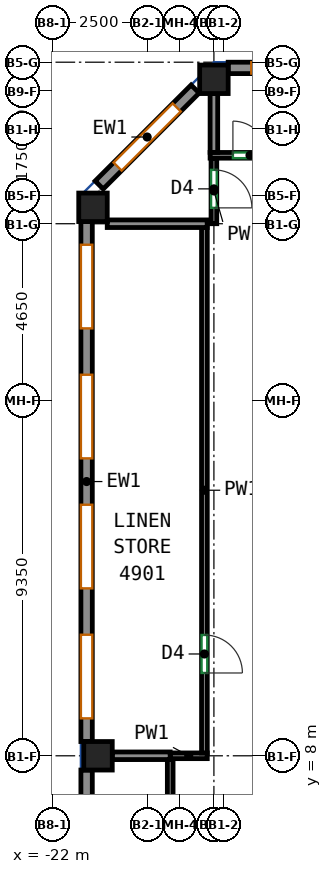
"""IFC4 building model, lengths in metres.
Left out: names, types, materials, properties, quantities, classifications, styles, units other than length and angle.
Written with IfcOpenShell. Run it as: python <this file> out.ifc"""

import sys

from ifc_helpers import new_model, si_unit, direction, frame, frame_2d, origin, origin_2d, place, context, subcontext, project, spatial, rectangle, extrude, source, transform, mapped, element, fill, save


model = new_model("IFC4")
c1 = context("Model", 3, precision=1e-05, world=origin(), true_north=direction((0.0, 1.0)))
c2 = subcontext(c1, "Body", "Model", "MODEL_VIEW")
j1 = project(units=[si_unit("LENGTHUNIT", "METRE"), si_unit("PLANEANGLEUNIT", "RADIAN")], contexts=[c1])
p1 = place(None, origin())
s1 = spatial("IfcSite", under=j1, at=p1, CompositionType="ELEMENT")
p2 = place(p1, origin())
s2 = spatial("IfcBuilding", under=s1, at=p2, CompositionType="ELEMENT")
p3 = place(p2, frame((0.0, 0.0, 203.3)))
s3 = spatial("IfcBuildingStorey", under=s2, at=p3, CompositionType="ELEMENT", Elevation=203.3)
m1 = source(origin(), c2, "Body", "SweptSolid", [
    extrude(rectangle(XDim=0.75, YDim=0.75, at=origin_2d()), origin(), (0.0, 0.0, 1.0), 3.12),
])
for number, where, z_axis, x_axis in (
    (1, (-20.932, 22.432, 0.0), (0.0, 0.0, 1.0), (1.0, 0.0, 0.0)),
    (2, (-20.8, 8.0, 0.0), (0.0, 0.0, 1.0), (1.0, 0.0, 0.0)),
    (3, (-17.75, 25.8, 0.0), (0.0, 0.0, 1.0), (1.0, 0.0, 0.0)),
):
    element("IfcColumn", number, at=place(p3, frame(where, z_axis=z_axis, x_axis=x_axis)), inside=s3, PredefinedType="COLUMN", context=c2, shape_type="MappedRepresentation", body=[
        mapped(m1, transform((0.0, 0.0, 0.0))),
    ])
m2 = source(origin(), c2, "Body", "SweptSolid", [
    extrude(rectangle(XDim=6.833, YDim=0.3, at=frame_2d((3.417, 0.0))), origin(), (0.0, 0.0, 1.0), 3.12),
])
p4 = place(p3, frame((-10.542, 26.1, 0.0), z_axis=(0.0, 0.0, 1.0), x_axis=(-1.0, 0.0, 0.0)))
e4 = element("IfcWall", 4, at=p4, inside=s3, PredefinedType="SOLIDWALL", context=c2, shape_type="MappedRepresentation", body=[
    mapped(m2, transform((0.0, 0.0, 0.0))),
])
p5 = place(p4, frame((0.608, 0.0, 0.85)))
e5 = element("IfcOpeningElement", 5, at=p5, cuts=e4, PredefinedType="OPENING", context=c2, shape_type="SweptSolid", body=[
    extrude(rectangle(XDim=2.2, YDim=1.95, at=frame_2d((1.1, 0.975))), frame((0.0, 0.16, 0.0), z_axis=(0.0, -1.0, 0.0), x_axis=(1.0, 0.0, 0.0)), (0.0, 0.0, 1.0), 0.32),
])
p6 = place(p4, frame((4.025, 0.0, 0.85)))
e6 = element("IfcOpeningElement", 6, at=p6, cuts=e4, PredefinedType="OPENING", context=c2, shape_type="SweptSolid", body=[
    extrude(rectangle(XDim=2.2, YDim=1.95, at=frame_2d((1.1, 0.975))), frame((0.0, 0.16, 0.0), z_axis=(0.0, -1.0, 0.0), x_axis=(1.0, 0.0, 0.0)), (0.0, 0.0, 1.0), 0.32),
])
m3 = source(origin(), c2, "Body", "SweptSolid", [
    extrude(rectangle(XDim=3.571, YDim=0.3, at=frame_2d((1.786, 0.0))), origin(), (0.0, 0.0, 1.0), 3.12),
])
p7 = place(p3, frame((-18.244, 25.544, 0.0), z_axis=(0.0, 0.0, 1.0), x_axis=(-0.707072595841, -0.707140964879, 0.0)))
e7 = element("IfcWall", 7, at=p7, inside=s3, PredefinedType="SOLIDWALL", context=c2, shape_type="MappedRepresentation", body=[
    mapped(m3, transform((0.0, 0.0, 0.0))),
])
p8 = place(p7, frame((0.686, 0.0, 0.85)))
e8 = element("IfcOpeningElement", 8, at=p8, cuts=e7, PredefinedType="OPENING", context=c2, shape_type="SweptSolid", body=[
    extrude(rectangle(XDim=2.2, YDim=1.95, at=frame_2d((1.1, 0.975))), frame((0.0, 0.16, 0.0), z_axis=(0.0, -1.0, 0.0), x_axis=(1.0, 0.0, 0.0)), (0.0, 0.0, 1.0), 0.32),
])
m4 = source(origin(), c2, "Body", "SweptSolid", [
    extrude(rectangle(XDim=13.682, YDim=0.3, at=frame_2d((6.841, 0.0))), origin(), (0.0, 0.0, 1.0), 3.12),
])
p9 = place(p3, frame((-21.1, 22.057, 0.0), z_axis=(0.0, 0.0, 1.0), x_axis=(0.0, -1.0, 0.0)))
e9 = element("IfcWall", 9, at=p9, inside=s3, PredefinedType="SOLIDWALL", context=c2, shape_type="MappedRepresentation", body=[
    mapped(m4, transform((0.0, 0.0, 0.0))),
])
p10 = place(p9, frame((0.61, 0.0, 0.85)))
e10 = element("IfcOpeningElement", 10, at=p10, cuts=e9, PredefinedType="OPENING", context=c2, shape_type="SweptSolid", body=[
    extrude(rectangle(XDim=2.2, YDim=1.95, at=frame_2d((1.1, 0.975))), frame((0.0, 0.16, 0.0), z_axis=(0.0, -1.0, 0.0), x_axis=(1.0, 0.0, 0.0)), (0.0, 0.0, 1.0), 0.32),
])
p11 = place(p9, frame((4.031, 0.0, 0.85)))
e11 = element("IfcOpeningElement", 11, at=p11, cuts=e9, PredefinedType="OPENING", context=c2, shape_type="SweptSolid", body=[
    extrude(rectangle(XDim=2.2, YDim=1.95, at=frame_2d((1.1, 0.975))), frame((0.0, 0.16, 0.0), z_axis=(0.0, -1.0, 0.0), x_axis=(1.0, 0.0, 0.0)), (0.0, 0.0, 1.0), 0.32),
])
p12 = place(p9, frame((7.451, 0.0, 0.85)))
e12 = element("IfcOpeningElement", 12, at=p12, cuts=e9, PredefinedType="OPENING", context=c2, shape_type="SweptSolid", body=[
    extrude(rectangle(XDim=2.2, YDim=1.95, at=frame_2d((1.1, 0.975))), frame((0.0, 0.16, 0.0), z_axis=(0.0, -1.0, 0.0), x_axis=(1.0, 0.0, 0.0)), (0.0, 0.0, 1.0), 0.32),
])
p13 = place(p9, frame((10.872, 0.0, 0.85)))
e13 = element("IfcOpeningElement", 13, at=p13, cuts=e9, PredefinedType="OPENING", context=c2, shape_type="SweptSolid", body=[
    extrude(rectangle(XDim=2.2, YDim=1.95, at=frame_2d((1.1, 0.975))), frame((0.0, 0.16, 0.0), z_axis=(0.0, -1.0, 0.0), x_axis=(1.0, 0.0, 0.0)), (0.0, 0.0, 1.0), 0.32),
])
m5 = source(origin(), c2, "Body", "SweptSolid", [
    extrude(rectangle(XDim=7.812, YDim=0.3, at=frame_2d((3.906, 0.0))), origin(), (0.0, 0.0, 1.0), 3.12),
])
p14 = place(p3, frame((-21.1, 7.625, 0.0), z_axis=(0.0, 0.0, 1.0), x_axis=(0.0, -1.0, 0.0)))
e14 = element("IfcWall", 14, at=p14, inside=s3, PredefinedType="SOLIDWALL", context=c2, shape_type="MappedRepresentation", body=[
    mapped(m5, transform((0.0, 0.0, 0.0))),
])
p15 = place(p14, frame((0.853, 0.0, 0.85)))
e15 = element("IfcOpeningElement", 15, at=p15, cuts=e14, PredefinedType="OPENING", context=c2, shape_type="SweptSolid", body=[
    extrude(rectangle(XDim=2.2, YDim=1.95, at=frame_2d((1.1, 0.975))), frame((0.0, 0.16, 0.0), z_axis=(0.0, -1.0, 0.0), x_axis=(1.0, 0.0, 0.0)), (0.0, 0.0, 1.0), 0.32),
])
p16 = place(p14, frame((4.759, 0.0, 0.85)))
e16 = element("IfcOpeningElement", 16, at=p16, cuts=e14, PredefinedType="OPENING", context=c2, shape_type="SweptSolid", body=[
    extrude(rectangle(XDim=2.2, YDim=1.95, at=frame_2d((1.1, 0.975))), frame((0.0, 0.16, 0.0), z_axis=(0.0, -1.0, 0.0), x_axis=(1.0, 0.0, 0.0)), (0.0, 0.0, 1.0), 0.32),
])
p17 = place(p3, frame((-17.925, 8.0, 0.0), z_axis=(0.0, 0.0, 1.0), x_axis=(-1.0, 0.0, 0.0)))
e17 = element("IfcWall", 17, at=p17, inside=s3, PredefinedType="PARTITIONING", context=c2, shape_type="SweptSolid", body=[
    extrude(rectangle(XDim=0.976, YDim=0.15, at=frame_2d((0.488, 0.0))), origin(), (0.0, 0.0, 1.0), 3.12),
])
p18 = place(p3, frame((-18.0, 21.9, 0.0), z_axis=(0.0, 0.0, 1.0), x_axis=(0.0, -1.0, 0.0)))
e18 = element("IfcWall", 18, at=p18, inside=s3, PredefinedType="PARTITIONING", context=c2, shape_type="SweptSolid", body=[
    extrude(rectangle(XDim=13.825, YDim=0.15, at=frame_2d((6.913, 0.0))), origin(), (0.0, 0.0, 1.0), 3.12),
])
p19 = place(p18, frame((10.721, 0.0, 0.0)))
e19 = element("IfcOpeningElement", 19, at=p19, cuts=e18, PredefinedType="OPENING", context=c2, shape_type="SweptSolid", body=[
    extrude(rectangle(XDim=1.0, YDim=2.1, at=frame_2d((0.5, 1.05))), frame((0.0, 0.085, 0.0), z_axis=(0.0, -1.0, 0.0), x_axis=(1.0, 0.0, 0.0)), (0.0, 0.0, 1.0), 0.17),
])
p20 = place(p3, frame((-18.9, 3.809, 0.0), z_axis=(0.0, 0.0, 1.0), x_axis=(0.0, 1.0, 0.0)))
e20 = element("IfcWall", 20, at=p20, inside=s3, PredefinedType="PARTITIONING", context=c2, shape_type="SweptSolid", body=[
    extrude(rectangle(XDim=4.092, YDim=0.15, at=frame_2d((2.046, 0.0))), origin(), (0.0, 0.0, 1.0), 3.12),
])
p21 = place(p20, frame((2.111, 0.0, 0.0)))
e21 = element("IfcOpeningElement", 21, at=p21, cuts=e20, PredefinedType="OPENING", context=c2, shape_type="SweptSolid", body=[
    extrude(rectangle(XDim=1.0, YDim=2.1, at=frame_2d((0.5, 1.05))), frame((0.0, 0.085, 0.0), z_axis=(0.0, -1.0, 0.0), x_axis=(1.0, 0.0, 0.0)), (0.0, 0.0, 1.0), 0.17),
])
p22 = place(p3, frame((-17.75, 23.725, 0.0), z_axis=(0.0, 0.0, 1.0), x_axis=(0.0, -1.0, 0.0)))
e22 = element("IfcWall", 22, at=p22, inside=s3, PredefinedType="PARTITIONING", context=c2, shape_type="SweptSolid", body=[
    extrude(rectangle(XDim=1.725, YDim=0.15, at=frame_2d((0.863, 0.0))), origin(), (0.0, 0.0, 1.0), 3.12),
])
p23 = place(p22, frame((0.308, 0.0, 0.0)))
e23 = element("IfcOpeningElement", 23, at=p23, cuts=e22, PredefinedType="OPENING", context=c2, shape_type="SweptSolid", body=[
    extrude(rectangle(XDim=1.0, YDim=2.1, at=frame_2d((0.5, 1.05))), frame((0.0, 0.085, 0.0), z_axis=(0.0, -1.0, 0.0), x_axis=(1.0, 0.0, 0.0)), (0.0, 0.0, 1.0), 0.17),
])
p24 = place(p3, frame((-17.85, 23.8, 0.0), z_axis=(0.0, 0.0, 1.0), x_axis=(1.0, 0.0, 0.0)))
e24 = element("IfcWall", 24, at=p24, inside=s3, PredefinedType="PARTITIONING", context=c2, shape_type="SweptSolid", body=[
    extrude(rectangle(XDim=45.7, YDim=0.15, at=frame_2d((22.85, 0.0))), origin(), (0.0, 0.0, 1.0), 3.12),
])
p25 = place(p24, frame((0.6, 0.0, 0.0)))
e25 = element("IfcOpeningElement", 25, at=p25, cuts=e24, PredefinedType="OPENING", context=c2, shape_type="SweptSolid", body=[
    extrude(rectangle(XDim=0.9, YDim=2.1, at=frame_2d((0.45, 1.05))), frame((0.0, 0.085, 0.0), z_axis=(0.0, -1.0, 0.0), x_axis=(1.0, 0.0, 0.0)), (0.0, 0.0, 1.0), 0.17),
])
p26 = place(p24, frame((4.081, 0.0, 0.0)))
e26 = element("IfcOpeningElement", 26, at=p26, cuts=e24, PredefinedType="OPENING", context=c2, shape_type="SweptSolid", body=[
    extrude(rectangle(XDim=1.0, YDim=2.1, at=frame_2d((0.5, 1.05))), frame((0.0, 0.085, 0.0), z_axis=(0.0, -1.0, 0.0), x_axis=(1.0, 0.0, 0.0)), (0.0, 0.0, 1.0), 0.17),
])
p27 = place(p24, frame((9.481, 0.0, 0.0)))
e27 = element("IfcOpeningElement", 27, at=p27, cuts=e24, PredefinedType="OPENING", context=c2, shape_type="SweptSolid", body=[
    extrude(rectangle(XDim=0.9, YDim=2.1, at=frame_2d((0.45, 1.05))), frame((0.0, 0.085, 0.0), z_axis=(0.0, -1.0, 0.0), x_axis=(1.0, 0.0, 0.0)), (0.0, 0.0, 1.0), 0.17),
])
p28 = place(p24, frame((12.803, 0.0, 0.0)))
e28 = element("IfcOpeningElement", 28, at=p28, cuts=e24, PredefinedType="OPENING", context=c2, shape_type="SweptSolid", body=[
    extrude(rectangle(XDim=1.0, YDim=2.1, at=frame_2d((0.5, 1.05))), frame((0.0, 0.085, 0.0), z_axis=(0.0, -1.0, 0.0), x_axis=(1.0, 0.0, 0.0)), (0.0, 0.0, 1.0), 0.17),
])
p29 = place(p24, frame((15.489, 0.0, 0.0)))
e29 = element("IfcOpeningElement", 29, at=p29, cuts=e24, PredefinedType="OPENING", context=c2, shape_type="SweptSolid", body=[
    extrude(rectangle(XDim=0.9, YDim=2.1, at=frame_2d((0.45, 1.05))), frame((0.0, 0.085, 0.0), z_axis=(0.0, -1.0, 0.0), x_axis=(1.0, 0.0, 0.0)), (0.0, 0.0, 1.0), 0.17),
])
p30 = place(p24, frame((21.244, 0.0, 0.0)))
e30 = element("IfcOpeningElement", 30, at=p30, cuts=e24, PredefinedType="OPENING", context=c2, shape_type="SweptSolid", body=[
    extrude(rectangle(XDim=0.9, YDim=2.1, at=frame_2d((0.45, 1.05))), frame((0.0, 0.085, 0.0), z_axis=(0.0, -1.0, 0.0), x_axis=(1.0, 0.0, 0.0)), (0.0, 0.0, 1.0), 0.17),
])
p31 = place(p24, frame((23.542, 0.0, 0.0)))
e31 = element("IfcOpeningElement", 31, at=p31, cuts=e24, PredefinedType="OPENING", context=c2, shape_type="SweptSolid", body=[
    extrude(rectangle(XDim=1.0, YDim=2.1, at=frame_2d((0.5, 1.05))), frame((0.0, 0.085, 0.0), z_axis=(0.0, -1.0, 0.0), x_axis=(1.0, 0.0, 0.0)), (0.0, 0.0, 1.0), 0.17),
])
p32 = place(p24, frame((28.841, 0.0, 0.0)))
e32 = element("IfcOpeningElement", 32, at=p32, cuts=e24, PredefinedType="OPENING", context=c2, shape_type="SweptSolid", body=[
    extrude(rectangle(XDim=0.9, YDim=2.1, at=frame_2d((0.45, 1.05))), frame((0.0, 0.085, 0.0), z_axis=(0.0, -1.0, 0.0), x_axis=(1.0, 0.0, 0.0)), (0.0, 0.0, 1.0), 0.17),
])
p33 = place(p24, frame((32.331, 0.0, 0.0)))
e33 = element("IfcOpeningElement", 33, at=p33, cuts=e24, PredefinedType="OPENING", context=c2, shape_type="SweptSolid", body=[
    extrude(rectangle(XDim=1.0, YDim=2.1, at=frame_2d((0.5, 1.05))), frame((0.0, 0.085, 0.0), z_axis=(0.0, -1.0, 0.0), x_axis=(1.0, 0.0, 0.0)), (0.0, 0.0, 1.0), 0.17),
])
p34 = place(p24, frame((35.42, 0.0, 0.0)))
e34 = element("IfcOpeningElement", 34, at=p34, cuts=e24, PredefinedType="OPENING", context=c2, shape_type="SweptSolid", body=[
    extrude(rectangle(XDim=0.9, YDim=2.1, at=frame_2d((0.45, 1.05))), frame((0.0, 0.085, 0.0), z_axis=(0.0, -1.0, 0.0), x_axis=(1.0, 0.0, 0.0)), (0.0, 0.0, 1.0), 0.17),
])
p35 = place(p24, frame((40.317, 0.0, 0.0)))
e35 = element("IfcOpeningElement", 35, at=p35, cuts=e24, PredefinedType="OPENING", context=c2, shape_type="SweptSolid", body=[
    extrude(rectangle(XDim=0.9, YDim=2.1, at=frame_2d((0.45, 1.05))), frame((0.0, 0.085, 0.0), z_axis=(0.0, -1.0, 0.0), x_axis=(1.0, 0.0, 0.0)), (0.0, 0.0, 1.0), 0.17),
])
p36 = place(p24, frame((43.199, 0.0, 0.0)))
e36 = element("IfcOpeningElement", 36, at=p36, cuts=e24, PredefinedType="OPENING", context=c2, shape_type="SweptSolid", body=[
    extrude(rectangle(XDim=1.0, YDim=2.1, at=frame_2d((0.5, 1.05))), frame((0.0, 0.085, 0.0), z_axis=(0.0, -1.0, 0.0), x_axis=(1.0, 0.0, 0.0)), (0.0, 0.0, 1.0), 0.17),
])
p37 = place(p3, frame((-20.425, 8.0, 0.0), z_axis=(0.0, 0.0, 1.0), x_axis=(0.999999794741, 0.000640717472, 0.0)))
e37 = element("IfcWall", 37, at=p37, inside=s3, PredefinedType="PARTITIONING", context=c2, shape_type="SweptSolid", body=[
    extrude(rectangle(XDim=1.524, YDim=0.2, at=frame_2d((0.762, 0.0))), origin(), (0.0, 0.0, 1.0), 3.12),
])
p38 = place(p3, frame((-17.927, 22.0, 0.0), z_axis=(0.0, 0.0, 1.0), x_axis=(-1.0, 0.0, 0.0)))
e38 = element("IfcWall", 38, at=p38, inside=s3, PredefinedType="PARTITIONING", context=c2, shape_type="SweptSolid", body=[
    extrude(rectangle(XDim=2.63, YDim=0.2, at=frame_2d((1.315, 0.0))), origin(), (0.0, 0.0, 1.0), 3.12),
])
p39 = place(p3, frame((-17.75, 23.877, 0.0), z_axis=(0.0, 0.0, 1.0), x_axis=(0.0, 1.0, 0.0)))
e39 = element("IfcWall", 39, at=p39, inside=s3, PredefinedType="PARTITIONING", context=c2, shape_type="SweptSolid", body=[
    extrude(rectangle(XDim=1.548, YDim=0.2, at=frame_2d((0.774, 0.0))), origin(), (0.0, 0.0, 1.0), 3.12),
])
p40 = place(p6, origin())
e40 = element("IfcWindow", 40, at=p40, inside=s3, PartitioningType="SINGLE_PANEL", PredefinedType="WINDOW", context=c2, shape_type="SweptSolid", body=[
    extrude(rectangle(XDim=2.2, YDim=1.95, at=frame_2d((1.1, 0.975))), frame((0.0, 0.03, 0.0), z_axis=(0.0, -1.0, 0.0), x_axis=(1.0, 0.0, 0.0)), (0.0, 0.0, 1.0), 0.06),
])
fill(e6, e40)
p41 = place(p8, origin())
e41 = element("IfcWindow", 41, at=p41, inside=s3, PartitioningType="SINGLE_PANEL", PredefinedType="WINDOW", context=c2, shape_type="SweptSolid", body=[
    extrude(rectangle(XDim=2.2, YDim=1.95, at=frame_2d((1.1, 0.975))), frame((0.0, 0.03, 0.0), z_axis=(0.0, -1.0, 0.0), x_axis=(1.0, 0.0, 0.0)), (0.0, 0.0, 1.0), 0.06),
])
fill(e8, e41)
p42 = place(p10, origin())
e42 = element("IfcWindow", 42, at=p42, inside=s3, PartitioningType="SINGLE_PANEL", PredefinedType="WINDOW", context=c2, shape_type="SweptSolid", body=[
    extrude(rectangle(XDim=2.2, YDim=1.95, at=frame_2d((1.1, 0.975))), frame((0.0, 0.03, 0.0), z_axis=(0.0, -1.0, 0.0), x_axis=(1.0, 0.0, 0.0)), (0.0, 0.0, 1.0), 0.06),
])
fill(e10, e42)
p43 = place(p11, origin())
e43 = element("IfcWindow", 43, at=p43, inside=s3, PartitioningType="SINGLE_PANEL", PredefinedType="WINDOW", context=c2, shape_type="SweptSolid", body=[
    extrude(rectangle(XDim=2.2, YDim=1.95, at=frame_2d((1.1, 0.975))), frame((0.0, 0.03, 0.0), z_axis=(0.0, -1.0, 0.0), x_axis=(1.0, 0.0, 0.0)), (0.0, 0.0, 1.0), 0.06),
])
fill(e11, e43)
p44 = place(p12, origin())
e44 = element("IfcWindow", 44, at=p44, inside=s3, PartitioningType="SINGLE_PANEL", PredefinedType="WINDOW", context=c2, shape_type="SweptSolid", body=[
    extrude(rectangle(XDim=2.2, YDim=1.95, at=frame_2d((1.1, 0.975))), frame((0.0, 0.03, 0.0), z_axis=(0.0, -1.0, 0.0), x_axis=(1.0, 0.0, 0.0)), (0.0, 0.0, 1.0), 0.06),
])
fill(e12, e44)
p45 = place(p13, origin())
e45 = element("IfcWindow", 45, at=p45, inside=s3, PartitioningType="SINGLE_PANEL", PredefinedType="WINDOW", context=c2, shape_type="SweptSolid", body=[
    extrude(rectangle(XDim=2.2, YDim=1.95, at=frame_2d((1.1, 0.975))), frame((0.0, 0.03, 0.0), z_axis=(0.0, -1.0, 0.0), x_axis=(1.0, 0.0, 0.0)), (0.0, 0.0, 1.0), 0.06),
])
fill(e13, e45)
p46 = place(p19, origin())
e46 = element("IfcDoor", 46, at=p46, inside=s3, OperationType="SINGLE_SWING_RIGHT", PredefinedType="DOOR", context=c2, shape_type="SweptSolid", body=[
    extrude(rectangle(XDim=1.0, YDim=2.1, at=frame_2d((0.5, 1.05))), frame((0.0, 0.025, 0.0), z_axis=(0.0, -1.0, 0.0), x_axis=(1.0, 0.0, 0.0)), (0.0, 0.0, 1.0), 0.05),
])
fill(e19, e46)
p47 = place(p23, origin())
e47 = element("IfcDoor", 47, at=p47, inside=s3, OperationType="SINGLE_SWING_RIGHT", PredefinedType="DOOR", context=c2, shape_type="SweptSolid", body=[
    extrude(rectangle(XDim=1.0, YDim=2.1, at=frame_2d((0.5, 1.05))), frame((0.0, 0.025, 0.0), z_axis=(0.0, -1.0, 0.0), x_axis=(1.0, 0.0, 0.0)), (0.0, 0.0, 1.0), 0.05),
])
fill(e23, e47)
p48 = place(p25, origin())
e48 = element("IfcDoor", 48, at=p48, inside=s3, OperationType="SINGLE_SWING_LEFT", PredefinedType="DOOR", context=c2, shape_type="SweptSolid", body=[
    extrude(rectangle(XDim=0.9, YDim=2.1, at=frame_2d((0.45, 1.05))), frame((0.0, 0.025, 0.0), z_axis=(0.0, -1.0, 0.0), x_axis=(1.0, 0.0, 0.0)), (0.0, 0.0, 1.0), 0.05),
])
fill(e25, e48)
save(model, sys.argv[1])
